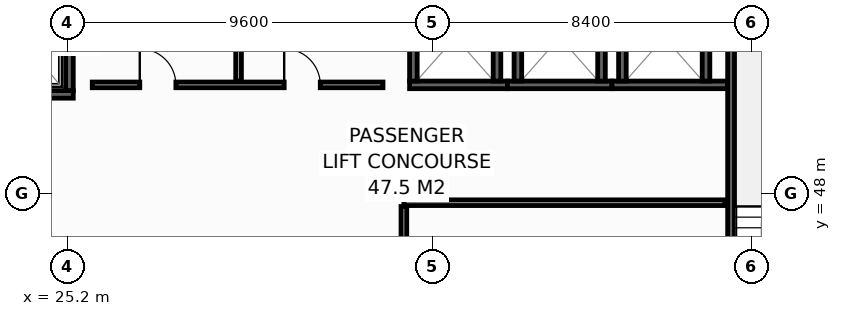
"""IFC4 building model, lengths in metres.
Left out: names, types, materials, properties, quantities, classifications, styles, units other than length and angle.
Written with IfcOpenShell. Run it as: python <this file> out.ifc"""

import sys

from ifc_helpers import new_model, si_unit, direction, frame, frame_2d, origin, place, context, subcontext, project, spatial, rectangle, extrude, element, fill, save


model = new_model("IFC4")
c1 = context("Model", 3, precision=1e-05, world=origin(), true_north=direction((0.0, 1.0)))
c2 = subcontext(c1, "Body", "Model", "MODEL_VIEW")
j1 = project(units=[si_unit("LENGTHUNIT", "METRE"), si_unit("PLANEANGLEUNIT", "RADIAN")], contexts=[c1])
p1 = place(None, origin())
s1 = spatial("IfcSite", under=j1, at=p1, CompositionType="ELEMENT")
p2 = place(p1, origin())
s2 = spatial("IfcBuilding", under=s1, at=p2, CompositionType="ELEMENT")
p3 = place(p2, frame((0.0, 0.0, 179.0)))
s3 = spatial("IfcBuildingStorey", under=s2, at=p3, CompositionType="ELEMENT", Elevation=179.0)
p4 = place(p3, frame((22.5, 50.6, 0.0), z_axis=(0.0, 0.0, 1.0), x_axis=(1.0, 0.0, 0.0)))
e1 = element("IfcWall", 1, at=p4, inside=s3, PredefinedType="SHEAR", context=c2, shape_type="SweptSolid", body=[
    extrude(rectangle(XDim=2.85, YDim=0.2, at=frame_2d((1.425, 0.0))), origin(), (0.0, 0.0, 1.0), 3.55),
])
p5 = place(p4, frame((0.925, 0.0, 0.0)))
e2 = element("IfcOpeningElement", 2, at=p5, cuts=e1, PredefinedType="OPENING", context=c2, shape_type="SweptSolid", body=[
    extrude(rectangle(XDim=1.25, YDim=2.3, at=frame_2d((0.625, 1.15))), frame((0.0, 0.11, 0.0), z_axis=(0.0, -1.0, 0.0), x_axis=(1.0, 0.0, 0.0)), (0.0, 0.0, 1.0), 0.22),
])
p6 = place(p3, frame((25.25, 50.7, 0.0), z_axis=(0.0, 0.0, 1.0), x_axis=(0.0, 1.0, 0.0)))
e3 = element("IfcWall", 3, at=p6, inside=s3, PredefinedType="SHEAR", context=c2, shape_type="SweptSolid", body=[
    extrude(rectangle(XDim=2.6, YDim=0.2, at=frame_2d((1.3, 0.0))), origin(), (0.0, 0.0, 1.0), 3.55),
])
p7 = place(p3, frame((34.2, 50.85, 0.0), z_axis=(0.0, 0.0, 1.0), x_axis=(1.0, 0.0, 0.0)))
e4 = element("IfcWall", 4, at=p7, inside=s3, PredefinedType="SHEAR", context=c2, shape_type="SweptSolid", body=[
    extrude(rectangle(XDim=2.575, YDim=0.2, at=frame_2d((1.288, 0.0))), origin(), (0.0, 0.0, 1.0), 3.55),
])
for number, where, z_axis, x_axis in (
    (5, (34.3, 50.95, 0.0), (0.0, 0.0, 1.0), (0.0, 1.0, 0.0)),
    (6, (36.5, 50.95, 0.0), (0.0, 0.0, 1.0), (0.0, 1.0, 0.0)),
):
    element("IfcWall", number, at=place(p3, frame(where, z_axis=z_axis, x_axis=x_axis)), inside=s3, PredefinedType="SHEAR", context=c2, shape_type="SweptSolid", body=[
        extrude(rectangle(XDim=2.3, YDim=0.2, at=frame_2d((1.15, 0.0))), origin(), (0.0, 0.0, 1.0), 3.55),
    ])
p8 = place(p3, frame((36.775, 50.85, 0.0), z_axis=(0.0, 0.0, 1.0), x_axis=(1.0, 0.0, 0.0)))
e7 = element("IfcWall", 7, at=p8, inside=s3, PredefinedType="SHEAR", context=c2, shape_type="SweptSolid", body=[
    extrude(rectangle(XDim=2.75, YDim=0.2, at=frame_2d((1.375, 0.0))), origin(), (0.0, 0.0, 1.0), 3.55),
])
for number, where, z_axis, x_axis in (
    (8, (37.05, 50.95, 0.0), (0.0, 0.0, 1.0), (0.0, 1.0, 0.0)),
    (9, (39.25, 50.95, 0.0), (0.0, 0.0, 1.0), (0.0, 1.0, 0.0)),
):
    element("IfcWall", number, at=place(p3, frame(where, z_axis=z_axis, x_axis=x_axis)), inside=s3, PredefinedType="SHEAR", context=c2, shape_type="SweptSolid", body=[
        extrude(rectangle(XDim=2.3, YDim=0.2, at=frame_2d((1.15, 0.0))), origin(), (0.0, 0.0, 1.0), 3.55),
    ])
p9 = place(p3, frame((39.525, 50.85, 0.0), z_axis=(0.0, 0.0, 1.0), x_axis=(1.0, 0.0, 0.0)))
e10 = element("IfcWall", 10, at=p9, inside=s3, PredefinedType="SHEAR", context=c2, shape_type="SweptSolid", body=[
    extrude(rectangle(XDim=3.045, YDim=0.2, at=frame_2d((1.522, 0.0))), origin(), (0.0, 0.0, 1.0), 3.55),
])
for number, where, z_axis, x_axis in (
    (11, (39.8, 50.95, 0.0), (0.0, 0.0, 1.0), (0.0, 1.0, 0.0)),
    (12, (42.0, 50.95, 0.0), (0.0, 0.0, 1.0), (0.0, 1.0, 0.0)),
):
    element("IfcWall", number, at=place(p3, frame(where, z_axis=z_axis, x_axis=x_axis)), inside=s3, PredefinedType="SHEAR", context=c2, shape_type="SweptSolid", body=[
        extrude(rectangle(XDim=2.3, YDim=0.2, at=frame_2d((1.15, 0.0))), origin(), (0.0, 0.0, 1.0), 3.55),
    ])
p10 = place(p3, frame((42.66, 53.8, 0.0), z_axis=(0.0, 0.0, 1.0), x_axis=(0.0, -1.0, 0.0)))
e13 = element("IfcWall", 13, at=p10, inside=s3, PredefinedType="SHEAR", context=c2, shape_type="SweptSolid", body=[
    extrude(rectangle(XDim=10.4, YDim=0.18, at=frame_2d((5.2, 0.0))), origin(), (0.0, 0.0, 1.0), 3.55),
])
p11 = place(p10, frame((8.99, 0.0, 0.0)))
e14 = element("IfcOpeningElement", 14, at=p11, cuts=e13, PredefinedType="OPENING", context=c2, shape_type="SweptSolid", body=[
    extrude(rectangle(XDim=1.1, YDim=2.15, at=frame_2d((0.55, 1.075))), frame((0.0, 0.1, 0.0), z_axis=(0.0, -1.0, 0.0), x_axis=(1.0, 0.0, 0.0)), (0.0, 0.0, 1.0), 0.2),
])
p12 = place(p3, frame((34.05, 47.75, 0.0), z_axis=(0.0, 0.0, 1.0), x_axis=(1.0, 0.0, 0.0)))
e15 = element("IfcWall", 15, at=p12, inside=s3, PredefinedType="PARTITIONING", context=c2, shape_type="SweptSolid", body=[
    extrude(rectangle(XDim=8.45, YDim=0.15, at=frame_2d((4.225, 0.0))), origin(), (0.0, 0.0, 1.0), 3.55),
])
p13 = place(p3, frame((34.05, 45.22, 0.0), z_axis=(0.0, 0.0, 1.0), x_axis=(0.0, 1.0, 0.0)))
e16 = element("IfcWall", 16, at=p13, inside=s3, PredefinedType="PARTITIONING", context=c2, shape_type="SweptSolid", body=[
    extrude(rectangle(XDim=2.43, YDim=0.15, at=frame_2d((1.215, 0.0))), origin(), (0.0, 0.0, 1.0), 3.55),
])
p14 = place(p3, frame((25.85, 50.85, 0.0), z_axis=(0.0, 0.0, 1.0), x_axis=(1.0, 0.0, 0.0)))
e17 = element("IfcWall", 17, at=p14, inside=s3, PredefinedType="PARTITIONING", context=c2, shape_type="SweptSolid", body=[
    extrude(rectangle(XDim=7.65, YDim=0.15, at=frame_2d((3.825, 0.0))), origin(), (0.0, 0.0, 1.0), 3.55),
])
p15 = place(p14, frame((1.25, 0.0, 0.0)))
e18 = element("IfcOpeningElement", 18, at=p15, cuts=e17, PredefinedType="OPENING", context=c2, shape_type="SweptSolid", body=[
    extrude(rectangle(XDim=0.95, YDim=2.15, at=frame_2d((0.475, 1.075))), frame((0.0, 0.085, 0.0), z_axis=(0.0, -1.0, 0.0), x_axis=(1.0, 0.0, 0.0)), (0.0, 0.0, 1.0), 0.17),
])
p16 = place(p14, frame((5.05, 0.0, 0.0)))
e19 = element("IfcOpeningElement", 19, at=p16, cuts=e17, PredefinedType="OPENING", context=c2, shape_type="SweptSolid", body=[
    extrude(rectangle(XDim=0.95, YDim=2.15, at=frame_2d((0.475, 1.075))), frame((0.0, 0.085, 0.0), z_axis=(0.0, -1.0, 0.0), x_axis=(1.0, 0.0, 0.0)), (0.0, 0.0, 1.0), 0.17),
])
p17 = place(p3, frame((29.7, 50.95, 0.0), z_axis=(0.0, 0.0, 1.0), x_axis=(0.0, 1.0, 0.0)))
e20 = element("IfcWall", 20, at=p17, inside=s3, PredefinedType="PARTITIONING", context=c2, shape_type="SweptSolid", body=[
    extrude(rectangle(XDim=2.7, YDim=0.15, at=frame_2d((1.35, 0.0))), origin(), (0.0, 0.0, 1.0), 3.55),
])
p18 = place(p15, origin())
e21 = element("IfcDoor", 21, at=p18, inside=s3, OperationType="SINGLE_SWING_LEFT", PredefinedType="DOOR", context=c2, shape_type="SweptSolid", body=[
    extrude(rectangle(XDim=0.95, YDim=2.15, at=frame_2d((0.475, 1.075))), frame((0.0, 0.025, 0.0), z_axis=(0.0, -1.0, 0.0), x_axis=(1.0, 0.0, 0.0)), (0.0, 0.0, 1.0), 0.05),
])
fill(e18, e21)
p19 = place(p16, origin())
e22 = element("IfcDoor", 22, at=p19, inside=s3, OperationType="SINGLE_SWING_LEFT", PredefinedType="DOOR", context=c2, shape_type="SweptSolid", body=[
    extrude(rectangle(XDim=0.95, YDim=2.15, at=frame_2d((0.475, 1.075))), frame((0.0, 0.025, 0.0), z_axis=(0.0, -1.0, 0.0), x_axis=(1.0, 0.0, 0.0)), (0.0, 0.0, 1.0), 0.05),
])
fill(e19, e22)
save(model, sys.argv[1])
